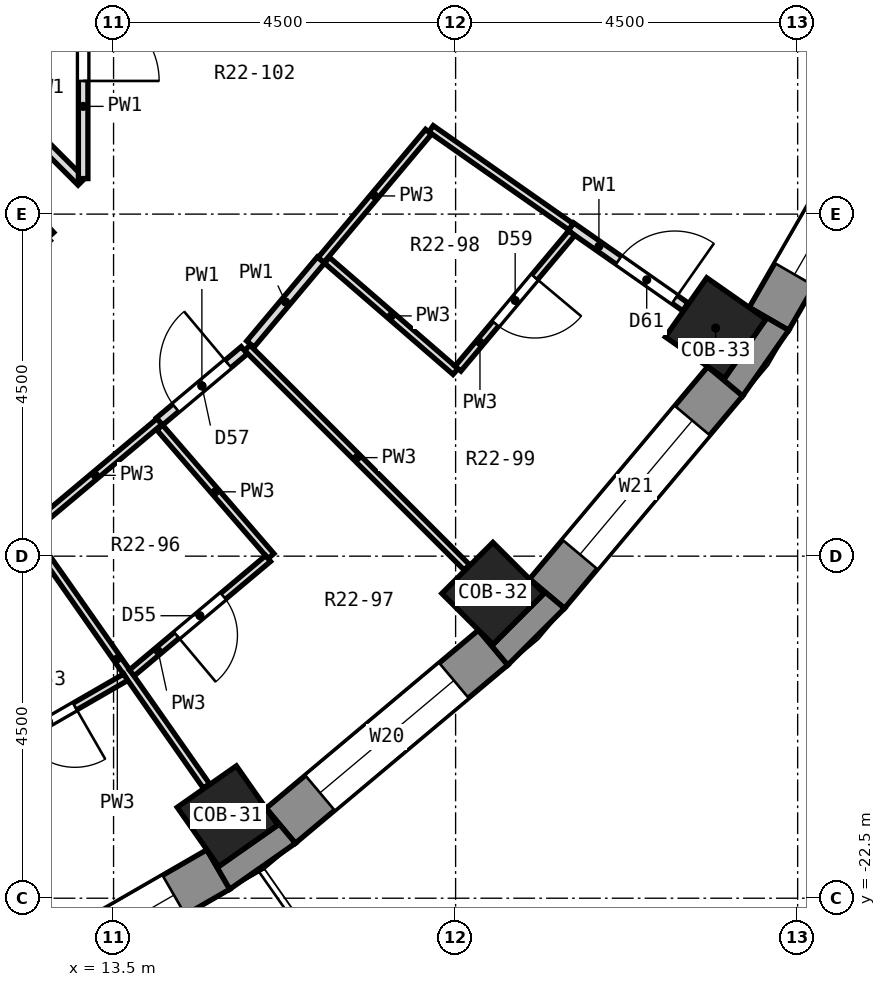
"""IFC4 building model, lengths in metres.
Left out: names, types, materials, properties, quantities, classifications, styles, units other than length and angle.
Written with IfcOpenShell. Run it as: python <this file> out.ifc"""

import sys

from ifc_helpers import new_model, si_unit, direction, frame, frame_2d, origin, origin_2d, place, context, subcontext, project, spatial, polyline, rectangle, outline, extrude, element, fill, save


model = new_model("IFC4")
c1 = context("Model", 3, precision=1e-05, world=origin(), true_north=direction((0.0, 1.0)))
c2 = subcontext(c1, "Body", "Model", "MODEL_VIEW")
j1 = project(units=[si_unit("LENGTHUNIT", "METRE"), si_unit("PLANEANGLEUNIT", "RADIAN")], contexts=[c1])
p1 = place(None, origin())
s1 = spatial("IfcSite", under=j1, at=p1, CompositionType="ELEMENT")
p2 = place(p1, origin())
s2 = spatial("IfcBuilding", under=s1, at=p2, CompositionType="ELEMENT")
p3 = place(p2, frame((0.0, 0.0, 141.4)))
s3 = spatial("IfcBuildingStorey", under=s2, at=p3, CompositionType="ELEMENT", Elevation=141.4)
for number, where, z_axis, x_axis in (
    (1, (14.999, -21.421, 0.0), (0.0, 0.0, 1.0), (0.574, -0.819, 0.0)),
    (2, (18.491, -18.491, 0.0), (0.0, 0.0, 1.0), (0.707, -0.707, 0.0)),
    (3, (21.421, -14.999, 0.0), (0.0, 0.0, 1.0), (0.819, -0.574, 0.0)),
):
    element("IfcColumn", number, at=place(p3, frame(where, z_axis=z_axis, x_axis=x_axis)), inside=s3, PredefinedType="COLUMN", context=c2, shape_type="SweptSolid", body=[
        extrude(rectangle(XDim=0.95, YDim=0.95, at=origin_2d()), origin(), (0.0, 0.0, 1.0), 3.3),
    ])
p4 = place(p3, frame((11.719, -23.946, 0.0), z_axis=(0.0, 0.0, 1.0), x_axis=(0.866051847062, 0.499954196102, 0.0)))
e4 = element("IfcWall", 4, at=p4, inside=s3, PredefinedType="SOLIDWALL", context=c2, shape_type="SweptSolid", body=[
    extrude(rectangle(XDim=3.648, YDim=0.6, at=frame_2d((1.824, 0.0))), origin(), (0.0, 0.0, 1.0), 2.8),
])
p5 = place(p4, frame((0.674, 0.0, 0.9)))
e5 = element("IfcOpeningElement", 5, at=p5, cuts=e4, PredefinedType="OPENING", context=c2, shape_type="SweptSolid", body=[
    extrude(rectangle(XDim=2.3, YDim=1.8, at=frame_2d((1.15, 0.9))), frame((0.0, 0.312, 0.0), z_axis=(0.0, -1.0, 0.0), x_axis=(1.0, 0.0, 0.0)), (0.0, 0.0, 1.0), 0.624),
])
p6 = place(p3, frame((15.699, -21.547, 0.0), z_axis=(0.0, 0.0, 1.0), x_axis=(0.766055462616, 0.642774476932, 0.0)))
e6 = element("IfcWall", 6, at=p6, inside=s3, PredefinedType="SOLIDWALL", context=c2, shape_type="SweptSolid", body=[
    extrude(rectangle(XDim=3.648, YDim=0.6, at=frame_2d((1.824, 0.0))), origin(), (0.0, 0.0, 1.0), 2.8),
])
p7 = place(p6, frame((0.674, 0.0, 0.9)))
e7 = element("IfcOpeningElement", 7, at=p7, cuts=e6, PredefinedType="OPENING", context=c2, shape_type="SweptSolid", body=[
    extrude(rectangle(XDim=2.3, YDim=1.8, at=frame_2d((1.15, 0.9))), frame((0.0, 0.312, 0.0), z_axis=(0.0, -1.0, 0.0), x_axis=(1.0, 0.0, 0.0)), (0.0, 0.0, 1.0), 0.624),
])
p8 = place(p3, frame((19.202, -18.494, 0.0), z_axis=(0.0, 0.0, 1.0), x_axis=(0.642774476932, 0.766055462616, 0.0)))
e8 = element("IfcWall", 8, at=p8, inside=s3, PredefinedType="SOLIDWALL", context=c2, shape_type="SweptSolid", body=[
    extrude(rectangle(XDim=3.648, YDim=0.6, at=frame_2d((1.824, 0.0))), origin(), (0.0, 0.0, 1.0), 2.8),
])
p9 = place(p8, frame((0.674, 0.0, 0.9)))
e9 = element("IfcOpeningElement", 9, at=p9, cuts=e8, PredefinedType="OPENING", context=c2, shape_type="SweptSolid", body=[
    extrude(rectangle(XDim=2.3, YDim=1.8, at=frame_2d((1.15, 0.9))), frame((0.0, 0.312, 0.0), z_axis=(0.0, -1.0, 0.0), x_axis=(1.0, 0.0, 0.0)), (0.0, 0.0, 1.0), 0.624),
])
p10 = place(p3, frame((22.122, -14.878, 0.0), z_axis=(0.0, 0.0, 1.0), x_axis=(0.499954196102, 0.866051847062, 0.0)))
e10 = element("IfcWall", 10, at=p10, inside=s3, PredefinedType="SOLIDWALL", context=c2, shape_type="SweptSolid", body=[
    extrude(rectangle(XDim=3.648, YDim=0.6, at=frame_2d((1.824, 0.0))), origin(), (0.0, 0.0, 1.0), 2.8),
])
p11 = place(p10, frame((0.674, 0.0, 0.9)))
e11 = element("IfcOpeningElement", 11, at=p11, cuts=e10, PredefinedType="OPENING", context=c2, shape_type="SweptSolid", body=[
    extrude(rectangle(XDim=2.3, YDim=1.8, at=frame_2d((1.15, 0.9))), frame((0.0, 0.312, 0.0), z_axis=(0.0, -1.0, 0.0), x_axis=(1.0, 0.0, 0.0)), (0.0, 0.0, 1.0), 0.624),
])
p12 = place(p3, origin())
e12 = element("IfcWall", 12, at=p12, inside=s3, PredefinedType="SOLIDWALL", context=c2, shape_type="SweptSolid", body=[
    extrude(outline(polyline([(15.892, -21.777), (15.506, -21.317), (15.661, -21.538), (14.882, -22.083), (14.728, -21.862), (15.028, -22.382), (15.892, -21.777)])), origin(), (0.0, 0.0, 1.0), 2.8),
])
p13 = place(p3, origin())
e13 = element("IfcWall", 13, at=p13, inside=s3, PredefinedType="SOLIDWALL", context=c2, shape_type="SweptSolid", body=[
    extrude(outline(polyline([(18.686, -19.432), (19.432, -18.686), (18.972, -18.301), (19.163, -18.491), (18.491, -19.163), (18.301, -18.972), (18.686, -19.432)])), origin(), (0.0, 0.0, 1.0), 2.8),
])
p14 = place(p3, origin())
e14 = element("IfcWall", 14, at=p14, inside=s3, PredefinedType="SOLIDWALL", context=c2, shape_type="SweptSolid", body=[
    extrude(outline(polyline([(22.382, -15.028), (21.862, -14.728), (22.083, -14.882), (21.538, -15.661), (21.317, -15.506), (21.777, -15.892), (22.382, -15.028)])), origin(), (0.0, 0.0, 1.0), 2.8),
])
p15 = place(p3, frame((12.377, -17.677, 0.0), z_axis=(0.0, 0.0, 1.0), x_axis=(0.573843281236, -0.818965132702, 0.0)))
e15 = element("IfcWall", 15, at=p15, inside=s3, PredefinedType="PARTITIONING", context=c2, shape_type="SweptSolid", body=[
    extrude(rectangle(XDim=4.086, YDim=0.1, at=frame_2d((2.043, 0.0))), origin(), (0.0, 0.0, 1.0), 2.8),
])
p16 = place(p3, frame((14.107, -16.307, 0.0), z_axis=(0.0, 0.0, 1.0), x_axis=(0.654423540777, -0.756128183099, 0.0)))
e16 = element("IfcWall", 16, at=p16, inside=s3, PredefinedType="PARTITIONING", context=c2, shape_type="SweptSolid", body=[
    extrude(rectangle(XDim=2.237, YDim=0.1, at=frame_2d((1.119, 0.0))), origin(), (0.0, 0.0, 1.0), 2.8),
])
p17 = place(p3, frame((11.295, -12.274, 0.0), z_axis=(0.0, 0.0, 1.0), x_axis=(0.676981317167, -0.736000201228, 0.0)))
e17 = element("IfcWall", 17, at=p17, inside=s3, PredefinedType="PARTITIONING", context=c2, shape_type="SweptSolid", body=[
    extrude(rectangle(XDim=2.039, YDim=0.1, at=frame_2d((1.02, 0.0))), origin(), (0.0, 0.0, 1.0), 2.8),
])
p18 = place(p3, frame((15.259, -15.259, 0.0), z_axis=(0.0, 0.0, 1.0), x_axis=(0.707106781187, -0.707106781187, 0.0)))
e18 = element("IfcWall", 18, at=p18, inside=s3, PredefinedType="PARTITIONING", context=c2, shape_type="SweptSolid", body=[
    extrude(rectangle(XDim=4.085, YDim=0.1, at=frame_2d((2.043, 0.0))), origin(), (0.0, 0.0, 1.0), 2.8),
])
p19 = place(p3, frame((11.388, -11.385, 0.0), z_axis=(0.0, 0.0, 1.0), x_axis=(0.707157874563, -0.707055684118, 0.0)))
e19 = element("IfcWall", 19, at=p19, inside=s3, PredefinedType="PARTITIONING", context=c2, shape_type="SweptSolid", body=[
    extrude(rectangle(XDim=2.389, YDim=0.125, at=frame_2d((1.195, 0.0))), origin(), (0.0, 0.0, 1.0), 2.8),
])
p20 = place(p3, frame((16.307, -14.107, 0.0), z_axis=(0.0, 0.0, 1.0), x_axis=(0.756128183099, -0.654423540777, 0.0)))
e20 = element("IfcWall", 20, at=p20, inside=s3, PredefinedType="PARTITIONING", context=c2, shape_type="SweptSolid", body=[
    extrude(rectangle(XDim=2.237, YDim=0.1, at=frame_2d((1.119, 0.0))), origin(), (0.0, 0.0, 1.0), 2.8),
])
p21 = place(p3, frame((19.517, -13.666, 0.0), z_axis=(0.0, 0.0, 1.0), x_axis=(0.819319221636, -0.573337608271, 0.0)))
e21 = element("IfcWall", 21, at=p21, inside=s3, PredefinedType="PARTITIONING", context=c2, shape_type="SweptSolid", body=[
    extrude(rectangle(XDim=1.839, YDim=0.125, at=frame_2d((0.919, 0.0))), origin(), (0.0, 0.0, 1.0), 2.8),
])
p22 = place(p21, frame((0.767, 0.0, 0.0)))
e22 = element("IfcOpeningElement", 22, at=p22, cuts=e21, PredefinedType="OPENING", context=c2, shape_type="SweptSolid", body=[
    extrude(rectangle(XDim=0.9, YDim=2.1, at=frame_2d((0.45, 1.05))), frame((0.0, 0.074, 0.0), z_axis=(0.0, -1.0, 0.0), x_axis=(1.0, 0.0, 0.0)), (0.0, 0.0, 1.0), 0.149),
])
p23 = place(p3, frame((17.677, -12.377, 0.0), z_axis=(0.0, 0.0, 1.0), x_axis=(0.81912468453, -0.573615508153, 0.0)))
e23 = element("IfcWall", 23, at=p23, inside=s3, PredefinedType="PARTITIONING", context=c2, shape_type="SweptSolid", body=[
    extrude(rectangle(XDim=2.246, YDim=0.1, at=frame_2d((1.123, 0.0))), origin(), (0.0, 0.0, 1.0), 2.8),
])
p24 = place(p3, frame((11.631, -20.763, 0.0), z_axis=(0.0, 0.0, 1.0), x_axis=(0.866130014302, 0.499818765479, 0.0)))
e24 = element("IfcWall", 24, at=p24, inside=s3, PredefinedType="PARTITIONING", context=c2, shape_type="SweptSolid", body=[
    extrude(rectangle(XDim=2.341, YDim=0.1, at=frame_2d((1.17, 0.0))), origin(), (0.0, 0.0, 1.0), 2.8),
])
p25 = place(p24, frame((0.771, 0.0, 0.0)))
e25 = element("IfcOpeningElement", 25, at=p25, cuts=e24, PredefinedType="OPENING", context=c2, shape_type="SweptSolid", body=[
    extrude(rectangle(XDim=0.8, YDim=2.1, at=frame_2d((0.4, 1.05))), frame((0.0, 0.062, 0.0), z_axis=(0.0, -1.0, 0.0), x_axis=(1.0, 0.0, 0.0)), (0.0, 0.0, 1.0), 0.124),
])
p26 = place(p3, frame((13.74, -19.536, 0.0), z_axis=(0.0, 0.0, 1.0), x_axis=(0.765924716163, 0.642930267735, 0.0)))
e26 = element("IfcWall", 26, at=p26, inside=s3, PredefinedType="PARTITIONING", context=c2, shape_type="SweptSolid", body=[
    extrude(rectangle(XDim=2.34, YDim=0.1, at=frame_2d((1.17, 0.0))), origin(), (0.0, 0.0, 1.0), 2.8),
])
p27 = place(p26, frame((0.77, 0.0, 0.0)))
e27 = element("IfcOpeningElement", 27, at=p27, cuts=e26, PredefinedType="OPENING", context=c2, shape_type="SweptSolid", body=[
    extrude(rectangle(XDim=0.8, YDim=2.1, at=frame_2d((0.4, 1.05))), frame((0.0, 0.062, 0.0), z_axis=(0.0, -1.0, 0.0), x_axis=(1.0, 0.0, 0.0)), (0.0, 0.0, 1.0), 0.124),
])
p28 = place(p3, frame((12.415, -17.645, 0.0), z_axis=(0.0, 0.0, 1.0), x_axis=(0.766093039246, 0.642729690631, 0.0)))
e28 = element("IfcWall", 28, at=p28, inside=s3, PredefinedType="PARTITIONING", context=c2, shape_type="SweptSolid", body=[
    extrude(rectangle(XDim=2.205, YDim=0.1, at=frame_2d((1.102, 0.0))), origin(), (0.0, 0.0, 1.0), 2.8),
])
p29 = place(p3, frame((14.104, -16.228, 0.0), z_axis=(0.0, 0.0, 1.0), x_axis=(0.766114305984, 0.642704341177, 0.0)))
e29 = element("IfcWall", 29, at=p29, inside=s3, PredefinedType="PARTITIONING", context=c2, shape_type="SweptSolid", body=[
    extrude(rectangle(XDim=1.456, YDim=0.125, at=frame_2d((0.728, 0.0))), origin(), (0.0, 0.0, 1.0), 2.8),
])
p30 = place(p29, frame((0.278, 0.0, 0.0)))
e30 = element("IfcOpeningElement", 30, at=p30, cuts=e29, PredefinedType="OPENING", context=c2, shape_type="SweptSolid", body=[
    extrude(rectangle(XDim=0.9, YDim=2.1, at=frame_2d((0.45, 1.05))), frame((0.0, 0.074, 0.0), z_axis=(0.0, -1.0, 0.0), x_axis=(1.0, 0.0, 0.0)), (0.0, 0.0, 1.0), 0.149),
])
p31 = place(p3, frame((18.031, -15.533, 0.0), z_axis=(0.0, 0.0, 1.0), x_axis=(0.64291410234, 0.765938285381, 0.0)))
e31 = element("IfcWall", 31, at=p31, inside=s3, PredefinedType="PARTITIONING", context=c2, shape_type="SweptSolid", body=[
    extrude(rectangle(XDim=2.328, YDim=0.1, at=frame_2d((1.164, 0.0))), origin(), (0.0, 0.0, 1.0), 2.8),
])
p32 = place(p31, frame((0.77, 0.0, 0.0)))
e32 = element("IfcOpeningElement", 32, at=p32, cuts=e31, PredefinedType="OPENING", context=c2, shape_type="SweptSolid", body=[
    extrude(rectangle(XDim=0.8, YDim=2.1, at=frame_2d((0.4, 1.05))), frame((0.0, 0.062, 0.0), z_axis=(0.0, -1.0, 0.0), x_axis=(1.0, 0.0, 0.0)), (0.0, 0.0, 1.0), 0.124),
])
p33 = place(p3, frame((16.228, -14.104, 0.0), z_axis=(0.0, 0.0, 1.0), x_axis=(0.642710935311, 0.766108774021, 0.0)))
e33 = element("IfcWall", 33, at=p33, inside=s3, PredefinedType="PARTITIONING", context=c2, shape_type="SweptSolid", body=[
    extrude(rectangle(XDim=2.202, YDim=0.1, at=frame_2d((1.101, 0.0))), origin(), (0.0, 0.0, 1.0), 2.8),
])
p34 = place(p3, frame((15.3, -15.21, 0.0), z_axis=(0.0, 0.0, 1.0), x_axis=(0.642676314535, 0.766137817064, 0.0)))
e34 = element("IfcWall", 34, at=p34, inside=s3, PredefinedType="PARTITIONING", context=c2, shape_type="SweptSolid", body=[
    extrude(rectangle(XDim=1.444, YDim=0.125, at=frame_2d((0.722, 0.0))), origin(), (0.0, 0.0, 1.0), 2.8),
])
p35 = place(p3, frame((13.1, -13.032, 0.0), z_axis=(0.0, 0.0, 1.0), x_axis=(0.0, 1.0, 0.0)))
e35 = element("IfcWall", 35, at=p35, inside=s3, PredefinedType="PARTITIONING", context=c2, shape_type="SweptSolid", body=[
    extrude(rectangle(XDim=3.632, YDim=0.125, at=frame_2d((1.816, 0.0))), origin(), (0.0, 0.0, 1.0), 2.8),
])
p36 = place(p35, frame((1.284, 0.0, 0.0)))
e36 = element("IfcOpeningElement", 36, at=p36, cuts=e35, PredefinedType="OPENING", context=c2, shape_type="SweptSolid", body=[
    extrude(rectangle(XDim=1.0, YDim=2.1, at=frame_2d((0.5, 1.05))), frame((0.0, 0.074, 0.0), z_axis=(0.0, -1.0, 0.0), x_axis=(1.0, 0.0, 0.0)), (0.0, 0.0, 1.0), 0.149),
])
p37 = place(p35, frame((2.435, 0.0, 0.0)))
e37 = element("IfcOpeningElement", 37, at=p37, cuts=e35, PredefinedType="OPENING", context=c2, shape_type="SweptSolid", body=[
    extrude(rectangle(XDim=0.9, YDim=2.1, at=frame_2d((0.45, 1.05))), frame((0.0, 0.074, 0.0), z_axis=(0.0, -1.0, 0.0), x_axis=(1.0, 0.0, 0.0)), (0.0, 0.0, 1.0), 0.149),
])
p38 = place(p5, origin())
e38 = element("IfcWindow", 38, at=p38, inside=s3, PartitioningType="SINGLE_PANEL", PredefinedType="WINDOW", context=c2, shape_type="SweptSolid", body=[
    extrude(rectangle(XDim=2.3, YDim=1.8, at=frame_2d((1.15, 0.9))), frame((0.0, 0.18, 0.0), z_axis=(0.0, -1.0, 0.0), x_axis=(1.0, 0.0, 0.0)), (0.0, 0.0, 1.0), 0.06),
])
fill(e5, e38)
p39 = place(p7, origin())
e39 = element("IfcWindow", 39, at=p39, inside=s3, PartitioningType="SINGLE_PANEL", PredefinedType="WINDOW", context=c2, shape_type="SweptSolid", body=[
    extrude(rectangle(XDim=2.3, YDim=1.8, at=frame_2d((1.15, 0.9))), frame((0.0, 0.18, 0.0), z_axis=(0.0, -1.0, 0.0), x_axis=(1.0, 0.0, 0.0)), (0.0, 0.0, 1.0), 0.06),
])
fill(e7, e39)
p40 = place(p9, origin())
e40 = element("IfcWindow", 40, at=p40, inside=s3, PartitioningType="SINGLE_PANEL", PredefinedType="WINDOW", context=c2, shape_type="SweptSolid", body=[
    extrude(rectangle(XDim=2.3, YDim=1.8, at=frame_2d((1.15, 0.9))), frame((0.0, 0.18, 0.0), z_axis=(0.0, -1.0, 0.0), x_axis=(1.0, 0.0, 0.0)), (0.0, 0.0, 1.0), 0.06),
])
fill(e9, e40)
p41 = place(p11, origin())
e41 = element("IfcWindow", 41, at=p41, inside=s3, PartitioningType="SINGLE_PANEL", PredefinedType="WINDOW", context=c2, shape_type="SweptSolid", body=[
    extrude(rectangle(XDim=2.3, YDim=1.8, at=frame_2d((1.15, 0.9))), frame((0.0, 0.18, 0.0), z_axis=(0.0, -1.0, 0.0), x_axis=(1.0, 0.0, 0.0)), (0.0, 0.0, 1.0), 0.06),
])
fill(e11, e41)
p42 = place(p25, frame((0.8, 0.0, 0.0), z_axis=(0.0, 0.0, 1.0), x_axis=(-1.0, 0.0, 0.0)))
e42 = element("IfcDoor", 42, at=p42, inside=s3, OperationType="SINGLE_SWING_LEFT", PredefinedType="DOOR", context=c2, shape_type="SweptSolid", body=[
    extrude(rectangle(XDim=0.8, YDim=2.1, at=frame_2d((0.4, 1.05))), frame((0.0, 0.025, 0.0), z_axis=(0.0, -1.0, 0.0), x_axis=(1.0, 0.0, 0.0)), (0.0, 0.0, 1.0), 0.05),
])
fill(e25, e42)
p43 = place(p27, frame((0.8, 0.0, 0.0), z_axis=(0.0, 0.0, 1.0), x_axis=(-1.0, 0.0, 0.0)))
e43 = element("IfcDoor", 43, at=p43, inside=s3, OperationType="SINGLE_SWING_RIGHT", PredefinedType="DOOR", context=c2, shape_type="SweptSolid", body=[
    extrude(rectangle(XDim=0.8, YDim=2.1, at=frame_2d((0.4, 1.05))), frame((0.0, 0.025, 0.0), z_axis=(0.0, -1.0, 0.0), x_axis=(1.0, 0.0, 0.0)), (0.0, 0.0, 1.0), 0.05),
])
fill(e27, e43)
p44 = place(p30, origin())
e44 = element("IfcDoor", 44, at=p44, inside=s3, OperationType="SINGLE_SWING_RIGHT", PredefinedType="DOOR", context=c2, shape_type="SweptSolid", body=[
    extrude(rectangle(XDim=0.9, YDim=2.1, at=frame_2d((0.45, 1.05))), frame((0.0, 0.025, 0.0), z_axis=(0.0, -1.0, 0.0), x_axis=(1.0, 0.0, 0.0)), (0.0, 0.0, 1.0), 0.05),
])
fill(e30, e44)
p45 = place(p36, frame((1.0, 0.0, 0.0), z_axis=(0.0, 0.0, 1.0), x_axis=(-1.0, 0.0, 0.0)))
e45 = element("IfcDoor", 45, at=p45, inside=s3, OperationType="SINGLE_SWING_RIGHT", PredefinedType="DOOR", context=c2, shape_type="SweptSolid", body=[
    extrude(rectangle(XDim=1.0, YDim=2.1, at=frame_2d((0.5, 1.05))), frame((0.0, 0.025, 0.0), z_axis=(0.0, -1.0, 0.0), x_axis=(1.0, 0.0, 0.0)), (0.0, 0.0, 1.0), 0.05),
])
fill(e36, e45)
p46 = place(p32, frame((0.8, 0.0, 0.0), z_axis=(0.0, 0.0, 1.0), x_axis=(-1.0, 0.0, 0.0)))
e46 = element("IfcDoor", 46, at=p46, inside=s3, OperationType="SINGLE_SWING_LEFT", PredefinedType="DOOR", context=c2, shape_type="SweptSolid", body=[
    extrude(rectangle(XDim=0.8, YDim=2.1, at=frame_2d((0.4, 1.05))), frame((0.0, 0.025, 0.0), z_axis=(0.0, -1.0, 0.0), x_axis=(1.0, 0.0, 0.0)), (0.0, 0.0, 1.0), 0.05),
])
fill(e32, e46)
p47 = place(p22, origin())
e47 = element("IfcDoor", 47, at=p47, inside=s3, OperationType="SINGLE_SWING_RIGHT", PredefinedType="DOOR", context=c2, shape_type="SweptSolid", body=[
    extrude(rectangle(XDim=0.9, YDim=2.1, at=frame_2d((0.45, 1.05))), frame((0.0, 0.025, 0.0), z_axis=(0.0, -1.0, 0.0), x_axis=(1.0, 0.0, 0.0)), (0.0, 0.0, 1.0), 0.05),
])
fill(e22, e47)
save(model, sys.argv[1])
